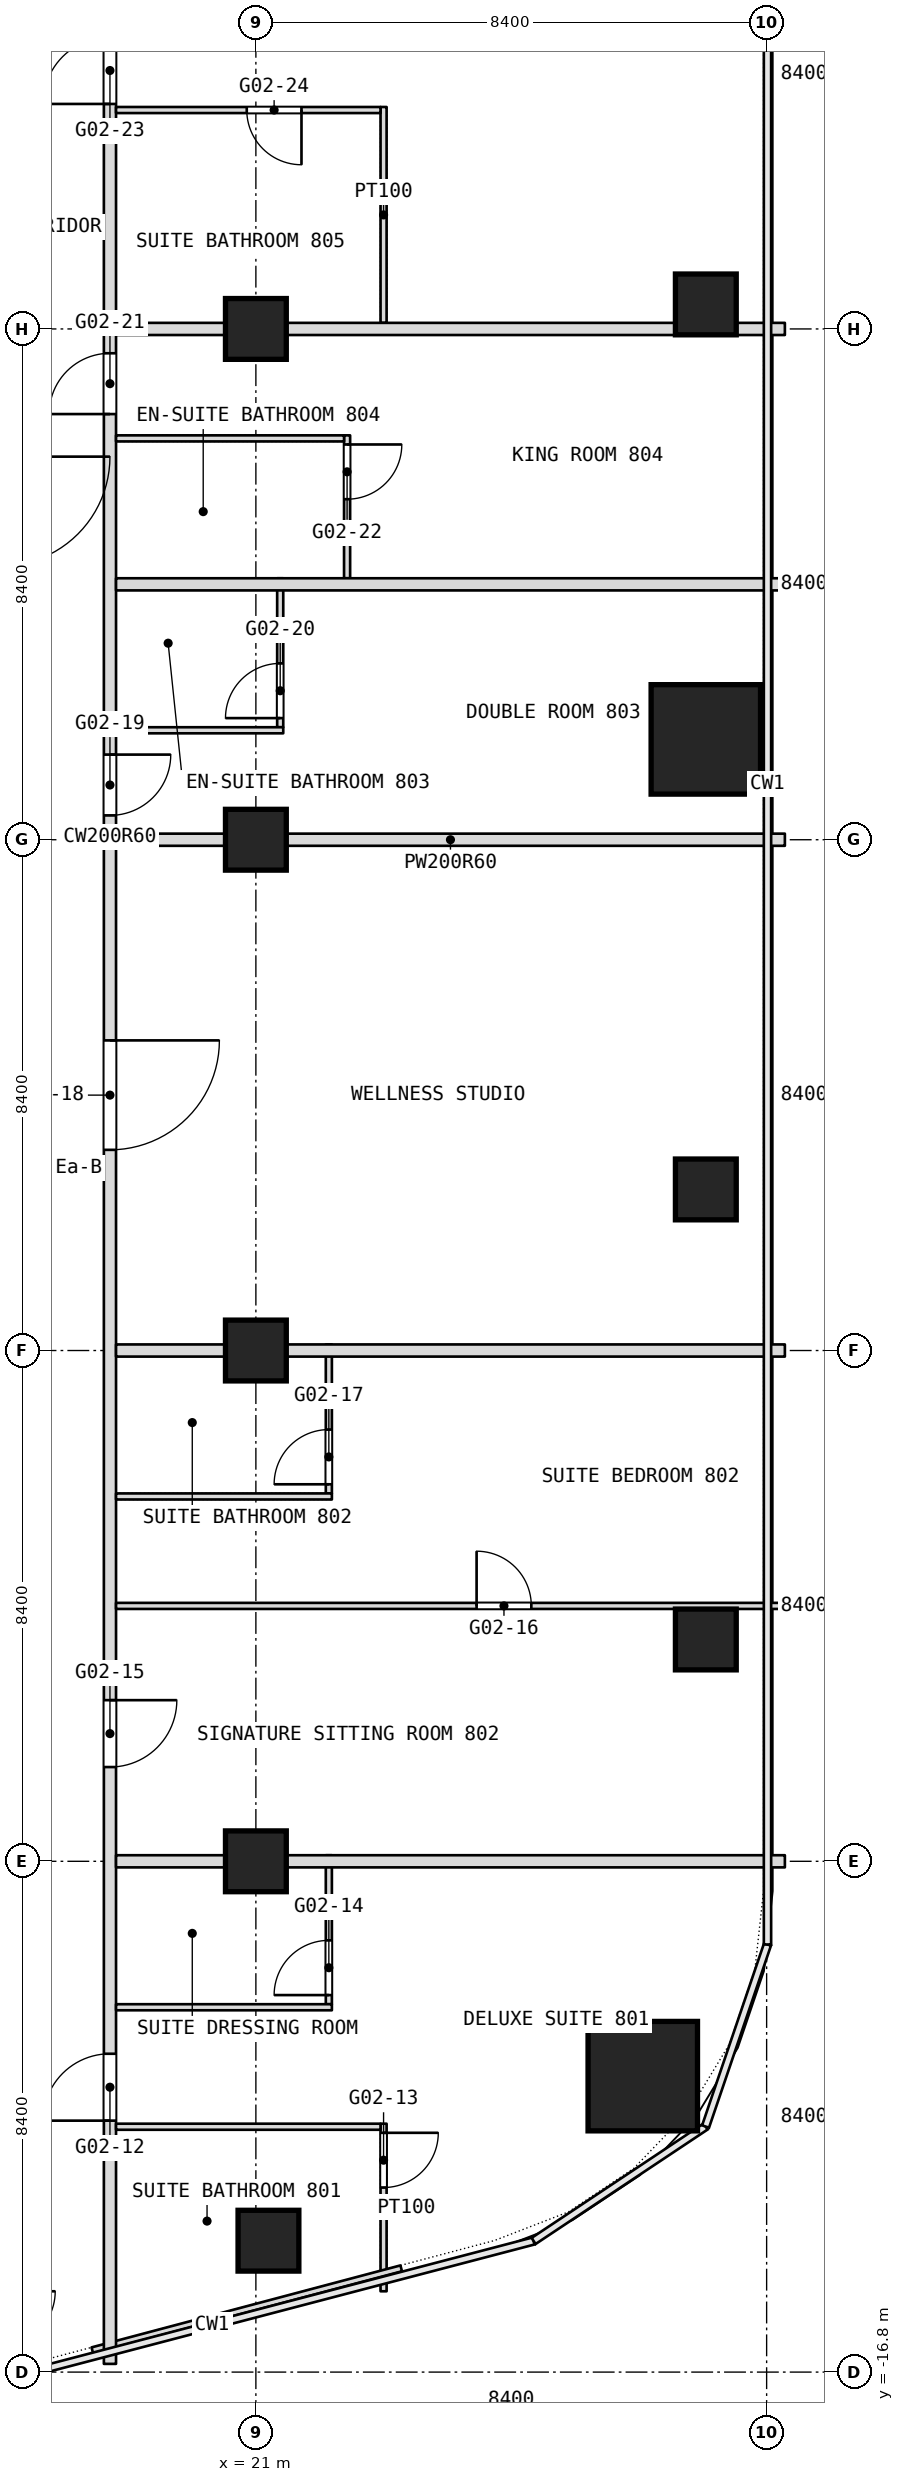
"""IFC4 building model, lengths in metres.
Left out: names, types, materials, properties, quantities, classifications, styles, units other than length and angle.
Written with IfcOpenShell. Run it as: python <this file> out.ifc"""

import sys

from ifc_helpers import new_model, si_unit, direction, frame, frame_2d, origin, origin_2d, place, context, subcontext, project, spatial, rectangle, extrude, element, fill, save


model = new_model("IFC4")
c1 = context("Model", 3, precision=1e-05, world=origin(), true_north=direction((0.0, 1.0)))
c2 = subcontext(c1, "Body", "Model", "MODEL_VIEW")
j1 = project(units=[si_unit("LENGTHUNIT", "METRE"), si_unit("PLANEANGLEUNIT", "RADIAN")], contexts=[c1])
p1 = place(None, origin())
s1 = spatial("IfcSite", under=j1, at=p1, CompositionType="ELEMENT")
p2 = place(p1, origin())
s2 = spatial("IfcBuilding", under=s1, at=p2, CompositionType="ELEMENT")
p3 = place(p2, frame((0.0, 0.0, 43.7)))
s3 = spatial("IfcBuildingStorey", under=s2, at=p3, CompositionType="ELEMENT", Elevation=43.7)
for number, where, z_axis, x_axis in (
    (1, (27.363, -11.933, 0.0), (0.0, 0.0, 1.0), (1.0, 0.0, 0.0)),
    (2, (28.4, 10.05, 0.0), (0.0, 0.0, 1.0), (1.0, 0.0, 0.0)),
):
    element("IfcColumn", number, at=place(p3, frame(where, z_axis=z_axis, x_axis=x_axis)), inside=s3, PredefinedType="COLUMN", context=c2, shape_type="SweptSolid", body=[
        extrude(rectangle(XDim=1.8, YDim=1.8, at=origin_2d()), origin(), (0.0, 0.0, 1.0), 3.6),
    ])
for number, where, z_axis, x_axis in (
    (3, (21.0, -8.4, 0.0), (0.0, 0.0, 1.0), (1.0, 0.0, 0.0)),
    (4, (21.0, 0.0, 0.0), (0.0, 0.0, 1.0), (1.0, 0.0, 0.0)),
    (5, (21.0, 8.4, 0.0), (0.0, 0.0, 1.0), (1.0, 0.0, 0.0)),
    (6, (21.0, 16.8, 0.0), (0.0, 0.0, 1.0), (1.0, 0.0, 0.0)),
    (7, (28.4, 17.203, 0.0), (0.0, 0.0, 1.0), (1.0, 0.0, 0.0)),
    (8, (28.4, 2.649, 0.0), (0.0, 0.0, 1.0), (1.0, 0.0, 0.0)),
    (9, (28.4, -4.752, 0.0), (0.0, 0.0, 1.0), (1.0, 0.0, 0.0)),
    (10, (21.207, -14.639, 0.0), (0.0, 0.0, 1.0), (1.0, 0.0, 0.0)),
):
    element("IfcColumn", number, at=place(p3, frame(where, z_axis=z_axis, x_axis=x_axis)), inside=s3, PredefinedType="COLUMN", context=c2, shape_type="SweptSolid", body=[
        extrude(rectangle(XDim=1.0, YDim=1.0, at=origin_2d()), origin(), (0.0, 0.0, 1.0), 3.6),
    ])
p4 = place(p3, frame((23.1, -15.471, 0.0), z_axis=(0.0, 0.0, 1.0), x_axis=(0.0, 1.0, 0.0)))
e11 = element("IfcWall", 11, at=p4, inside=s3, PredefinedType="PARTITIONING", context=c2, shape_type="SweptSolid", body=[
    extrude(rectangle(XDim=2.756, YDim=0.1, at=frame_2d((1.378, 0.0))), origin(), (0.0, 0.0, 1.0), 3.34),
])
p5 = place(p4, frame((1.706, 0.0, 0.0)))
e12 = element("IfcOpeningElement", 12, at=p5, cuts=e11, PredefinedType="OPENING", context=c2, shape_type="SweptSolid", body=[
    extrude(rectangle(XDim=0.9, YDim=2.1, at=frame_2d((0.45, 1.05))), frame((0.0, 0.05, 0.0), z_axis=(0.0, -1.0, 0.0), x_axis=(1.0, 0.0, 0.0)), (0.0, 0.0, 1.0), 0.1),
])
p6 = place(p3, frame((23.1, 16.9, 0.0), z_axis=(0.0, 0.0, 1.0), x_axis=(0.0, 1.0, 0.0)))
e13 = element("IfcWall", 13, at=p6, inside=s3, PredefinedType="PARTITIONING", context=c2, shape_type="SweptSolid", body=[
    extrude(rectangle(XDim=3.55, YDim=0.1, at=frame_2d((1.775, 0.0))), origin(), (0.0, 0.0, 1.0), 3.34),
])
p7 = place(p3, frame((22.5, 12.7, 0.0), z_axis=(0.0, 0.0, 1.0), x_axis=(0.0, 1.0, 0.0)))
e14 = element("IfcWall", 14, at=p7, inside=s3, PredefinedType="PARTITIONING", context=c2, shape_type="SweptSolid", body=[
    extrude(rectangle(XDim=2.35, YDim=0.1, at=frame_2d((1.175, 0.0))), origin(), (0.0, 0.0, 1.0), 3.34),
])
p8 = place(p7, frame((1.3, 0.0, 0.0)))
e15 = element("IfcOpeningElement", 15, at=p8, cuts=e14, PredefinedType="OPENING", context=c2, shape_type="SweptSolid", body=[
    extrude(rectangle(XDim=0.9, YDim=2.1, at=frame_2d((0.45, 1.05))), frame((0.0, 0.05, 0.0), z_axis=(0.0, -1.0, 0.0), x_axis=(1.0, 0.0, 0.0)), (0.0, 0.0, 1.0), 0.1),
])
p9 = place(p3, frame((22.2, -10.75, 0.0), z_axis=(0.0, 0.0, 1.0), x_axis=(0.0, 1.0, 0.0)))
e16 = element("IfcWall", 16, at=p9, inside=s3, PredefinedType="PARTITIONING", context=c2, shape_type="SweptSolid", body=[
    extrude(rectangle(XDim=2.45, YDim=0.1, at=frame_2d((1.225, 0.0))), origin(), (0.0, 0.0, 1.0), 3.34),
])
p10 = place(p9, frame((0.15, 0.0, 0.0)))
e17 = element("IfcOpeningElement", 17, at=p10, cuts=e16, PredefinedType="OPENING", context=c2, shape_type="SweptSolid", body=[
    extrude(rectangle(XDim=0.9, YDim=2.1, at=frame_2d((0.45, 1.05))), frame((0.0, 0.05, 0.0), z_axis=(0.0, -1.0, 0.0), x_axis=(1.0, 0.0, 0.0)), (0.0, 0.0, 1.0), 0.1),
])
p11 = place(p3, frame((22.2, -2.35, 0.0), z_axis=(0.0, 0.0, 1.0), x_axis=(0.0, 1.0, 0.0)))
e18 = element("IfcWall", 18, at=p11, inside=s3, PredefinedType="PARTITIONING", context=c2, shape_type="SweptSolid", body=[
    extrude(rectangle(XDim=2.45, YDim=0.1, at=frame_2d((1.225, 0.0))), origin(), (0.0, 0.0, 1.0), 3.34),
])
p12 = place(p11, frame((0.15, 0.0, 0.0)))
e19 = element("IfcOpeningElement", 19, at=p12, cuts=e18, PredefinedType="OPENING", context=c2, shape_type="SweptSolid", body=[
    extrude(rectangle(XDim=0.9, YDim=2.1, at=frame_2d((0.45, 1.05))), frame((0.0, 0.05, 0.0), z_axis=(0.0, -1.0, 0.0), x_axis=(1.0, 0.0, 0.0)), (0.0, 0.0, 1.0), 0.1),
])
p13 = place(p3, frame((21.4, 10.25, 0.0), z_axis=(0.0, 0.0, 1.0), x_axis=(0.0, 1.0, 0.0)))
e20 = element("IfcWall", 20, at=p13, inside=s3, PredefinedType="PARTITIONING", context=c2, shape_type="SweptSolid", body=[
    extrude(rectangle(XDim=2.45, YDim=0.1, at=frame_2d((1.225, 0.0))), origin(), (0.0, 0.0, 1.0), 3.34),
])
p14 = place(p13, frame((0.15, 0.0, 0.0)))
e21 = element("IfcOpeningElement", 21, at=p14, cuts=e20, PredefinedType="OPENING", context=c2, shape_type="SweptSolid", body=[
    extrude(rectangle(XDim=0.9, YDim=2.1, at=frame_2d((0.45, 1.05))), frame((0.0, 0.05, 0.0), z_axis=(0.0, -1.0, 0.0), x_axis=(1.0, 0.0, 0.0)), (0.0, 0.0, 1.0), 0.1),
])
p15 = place(p3, frame((18.31, -16.442, 0.0), z_axis=(0.0, 0.0, 1.0), x_axis=(0.966552628131, 0.256468354876, 0.0)))
e22 = element("IfcWall", 22, at=p15, inside=s3, PredefinedType="PARTITIONING", context=c2, shape_type="SweptSolid", body=[
    extrude(rectangle(XDim=5.256, YDim=0.1, at=frame_2d((2.628, 0.0))), origin(), (0.0, 0.0, 1.0), 3.34),
])
p16 = place(p3, frame((18.6, -16.665, 0.0), z_axis=(0.0, 0.0, 1.0), x_axis=(0.0, 1.0, 0.0)))
e23 = element("IfcWall", 23, at=p16, inside=s3, PredefinedType="PARTITIONING", context=c2, shape_type="SweptSolid", body=[
    extrude(rectangle(XDim=50.205, YDim=0.2, at=frame_2d((25.103, 0.0))), origin(), (0.0, 0.0, 1.0), 3.34),
])
p17 = place(p16, frame((4.0, 0.0, 0.0)))
e24 = element("IfcOpeningElement", 24, at=p17, cuts=e23, PredefinedType="OPENING", context=c2, shape_type="SweptSolid", body=[
    extrude(rectangle(XDim=1.1, YDim=2.1, at=frame_2d((0.55, 1.05))), frame((0.0, 0.1, 0.0), z_axis=(0.0, -1.0, 0.0), x_axis=(1.0, 0.0, 0.0)), (0.0, 0.0, 1.0), 0.2),
])
p18 = place(p16, frame((9.815, 0.0, 0.0)))
e25 = element("IfcOpeningElement", 25, at=p18, cuts=e23, PredefinedType="OPENING", context=c2, shape_type="SweptSolid", body=[
    extrude(rectangle(XDim=1.1, YDim=2.1, at=frame_2d((0.55, 1.05))), frame((0.0, 0.1, 0.0), z_axis=(0.0, -1.0, 0.0), x_axis=(1.0, 0.0, 0.0)), (0.0, 0.0, 1.0), 0.2),
])
p19 = place(p16, frame((19.965, 0.0, 0.0)))
e26 = element("IfcOpeningElement", 26, at=p19, cuts=e23, PredefinedType="OPENING", context=c2, shape_type="SweptSolid", body=[
    extrude(rectangle(XDim=1.8, YDim=2.1, at=frame_2d((0.9, 1.05))), frame((0.0, 0.1, 0.0), z_axis=(0.0, -1.0, 0.0), x_axis=(1.0, 0.0, 0.0)), (0.0, 0.0, 1.0), 0.2),
])
p20 = place(p16, frame((25.465, 0.0, 0.0)))
e27 = element("IfcOpeningElement", 27, at=p20, cuts=e23, PredefinedType="OPENING", context=c2, shape_type="SweptSolid", body=[
    extrude(rectangle(XDim=1.0, YDim=2.1, at=frame_2d((0.5, 1.05))), frame((0.0, 0.1, 0.0), z_axis=(0.0, -1.0, 0.0), x_axis=(1.0, 0.0, 0.0)), (0.0, 0.0, 1.0), 0.2),
])
p21 = place(p16, frame((32.065, 0.0, 0.0)))
e28 = element("IfcOpeningElement", 28, at=p21, cuts=e23, PredefinedType="OPENING", context=c2, shape_type="SweptSolid", body=[
    extrude(rectangle(XDim=1.0, YDim=2.1, at=frame_2d((0.5, 1.05))), frame((0.0, 0.1, 0.0), z_axis=(0.0, -1.0, 0.0), x_axis=(1.0, 0.0, 0.0)), (0.0, 0.0, 1.0), 0.2),
])
p22 = place(p16, frame((37.165, 0.0, 0.0)))
e29 = element("IfcOpeningElement", 29, at=p22, cuts=e23, PredefinedType="OPENING", context=c2, shape_type="SweptSolid", body=[
    extrude(rectangle(XDim=1.1, YDim=2.1, at=frame_2d((0.55, 1.05))), frame((0.0, 0.1, 0.0), z_axis=(0.0, -1.0, 0.0), x_axis=(1.0, 0.0, 0.0)), (0.0, 0.0, 1.0), 0.2),
])
p23 = place(p16, frame((42.265, 0.0, 0.0)))
e30 = element("IfcOpeningElement", 30, at=p23, cuts=e23, PredefinedType="OPENING", context=c2, shape_type="SweptSolid", body=[
    extrude(rectangle(XDim=1.0, YDim=2.1, at=frame_2d((0.5, 1.05))), frame((0.0, 0.1, 0.0), z_axis=(0.0, -1.0, 0.0), x_axis=(1.0, 0.0, 0.0)), (0.0, 0.0, 1.0), 0.2),
])
p24 = place(p16, frame((46.865, 0.0, 0.0)))
e31 = element("IfcOpeningElement", 31, at=p24, cuts=e23, PredefinedType="OPENING", context=c2, shape_type="SweptSolid", body=[
    extrude(rectangle(XDim=1.0, YDim=2.1, at=frame_2d((0.5, 1.05))), frame((0.0, 0.1, 0.0), z_axis=(0.0, -1.0, 0.0), x_axis=(1.0, 0.0, 0.0)), (0.0, 0.0, 1.0), 0.2),
])
p25 = place(p3, frame((18.7, -12.765, 0.0), z_axis=(0.0, 0.0, 1.0), x_axis=(1.0, 0.0, 0.0)))
e32 = element("IfcWall", 32, at=p25, inside=s3, PredefinedType="PARTITIONING", context=c2, shape_type="SweptSolid", body=[
    extrude(rectangle(XDim=4.35, YDim=0.1, at=frame_2d((2.175, 0.0))), origin(), (0.0, 0.0, 1.0), 3.34),
])
p26 = place(p3, frame((18.7, -10.8, 0.0), z_axis=(0.0, 0.0, 1.0), x_axis=(1.0, 0.0, 0.0)))
e33 = element("IfcWall", 33, at=p26, inside=s3, PredefinedType="PARTITIONING", context=c2, shape_type="SweptSolid", body=[
    extrude(rectangle(XDim=3.55, YDim=0.1, at=frame_2d((1.775, 0.0))), origin(), (0.0, 0.0, 1.0), 3.34),
])
p27 = place(p3, frame((18.7, -8.4, 0.0), z_axis=(0.0, 0.0, 1.0), x_axis=(1.0, 0.0, 0.0)))
e34 = element("IfcWall", 34, at=p27, inside=s3, PredefinedType="PARTITIONING", context=c2, shape_type="SweptSolid", body=[
    extrude(rectangle(XDim=11.0, YDim=0.2, at=frame_2d((5.5, 0.0))), origin(), (0.0, 0.0, 1.0), 2.84),
])
p28 = place(p3, frame((18.7, -4.2, 0.0), z_axis=(0.0, 0.0, 1.0), x_axis=(1.0, 0.0, 0.0)))
e35 = element("IfcWall", 35, at=p28, inside=s3, PredefinedType="PARTITIONING", context=c2, shape_type="SweptSolid", body=[
    extrude(rectangle(XDim=11.0, YDim=0.1, at=frame_2d((5.5, 0.0))), origin(), (0.0, 0.0, 1.0), 3.34),
])
p29 = place(p28, frame((5.93, 0.0, 0.0)))
e36 = element("IfcOpeningElement", 36, at=p29, cuts=e35, PredefinedType="OPENING", context=c2, shape_type="SweptSolid", body=[
    extrude(rectangle(XDim=0.9, YDim=2.1, at=frame_2d((0.45, 1.05))), frame((0.0, 0.05, 0.0), z_axis=(0.0, -1.0, 0.0), x_axis=(1.0, 0.0, 0.0)), (0.0, 0.0, 1.0), 0.1),
])
p30 = place(p3, frame((18.7, -2.4, 0.0), z_axis=(0.0, 0.0, 1.0), x_axis=(1.0, 0.0, 0.0)))
e37 = element("IfcWall", 37, at=p30, inside=s3, PredefinedType="PARTITIONING", context=c2, shape_type="SweptSolid", body=[
    extrude(rectangle(XDim=3.55, YDim=0.1, at=frame_2d((1.775, 0.0))), origin(), (0.0, 0.0, 1.0), 3.34),
])
for number, where, z_axis, x_axis in (
    (38, (18.7, 0.0, 0.0), (0.0, 0.0, 1.0), (1.0, 0.0, 0.0)),
    (39, (18.7, 8.4, 0.0), (0.0, 0.0, 1.0), (1.0, 0.0, 0.0)),
):
    element("IfcWall", number, at=place(p3, frame(where, z_axis=z_axis, x_axis=x_axis)), inside=s3, PredefinedType="PARTITIONING", context=c2, shape_type="SweptSolid", body=[
        extrude(rectangle(XDim=11.0, YDim=0.2, at=frame_2d((5.5, 0.0))), origin(), (0.0, 0.0, 1.0), 2.84),
    ])
p31 = place(p3, frame((18.7, 10.2, 0.0), z_axis=(0.0, 0.0, 1.0), x_axis=(1.0, 0.0, 0.0)))
e40 = element("IfcWall", 40, at=p31, inside=s3, PredefinedType="PARTITIONING", context=c2, shape_type="SweptSolid", body=[
    extrude(rectangle(XDim=2.75, YDim=0.1, at=frame_2d((1.375, 0.0))), origin(), (0.0, 0.0, 1.0), 3.34),
])
p32 = place(p3, frame((18.7, 12.6, 0.0), z_axis=(0.0, 0.0, 1.0), x_axis=(1.0, 0.0, 0.0)))
e41 = element("IfcWall", 41, at=p32, inside=s3, PredefinedType="PARTITIONING", context=c2, shape_type="SweptSolid", body=[
    extrude(rectangle(XDim=11.0, YDim=0.2, at=frame_2d((5.5, 0.0))), origin(), (0.0, 0.0, 1.0), 3.34),
])
p33 = place(p3, frame((18.7, 15.0, 0.0), z_axis=(0.0, 0.0, 1.0), x_axis=(1.0, 0.0, 0.0)))
e42 = element("IfcWall", 42, at=p33, inside=s3, PredefinedType="PARTITIONING", context=c2, shape_type="SweptSolid", body=[
    extrude(rectangle(XDim=3.75, YDim=0.1, at=frame_2d((1.875, 0.0))), origin(), (0.0, 0.0, 1.0), 3.34),
])
p34 = place(p3, frame((18.7, 16.8, 0.0), z_axis=(0.0, 0.0, 1.0), x_axis=(1.0, 0.0, 0.0)))
e43 = element("IfcWall", 43, at=p34, inside=s3, PredefinedType="PARTITIONING", context=c2, shape_type="SweptSolid", body=[
    extrude(rectangle(XDim=11.0, YDim=0.2, at=frame_2d((5.5, 0.0))), origin(), (0.0, 0.0, 1.0), 2.84),
])
p35 = place(p3, frame((18.7, 20.4, 0.0), z_axis=(0.0, 0.0, 1.0), x_axis=(1.0, 0.0, 0.0)))
e44 = element("IfcWall", 44, at=p35, inside=s3, PredefinedType="PARTITIONING", context=c2, shape_type="SweptSolid", body=[
    extrude(rectangle(XDim=4.35, YDim=0.1, at=frame_2d((2.175, 0.0))), origin(), (0.0, 0.0, 1.0), 3.34),
])
p36 = place(p35, frame((2.15, 0.0, 0.0)))
e45 = element("IfcOpeningElement", 45, at=p36, cuts=e44, PredefinedType="OPENING", context=c2, shape_type="SweptSolid", body=[
    extrude(rectangle(XDim=0.9, YDim=2.1, at=frame_2d((0.45, 1.05))), frame((0.0, 0.05, 0.0), z_axis=(0.0, -1.0, 0.0), x_axis=(1.0, 0.0, 0.0)), (0.0, 0.0, 1.0), 0.1),
])
p37 = place(p5, origin())
e46 = element("IfcDoor", 46, at=p37, inside=s3, OperationType="SINGLE_SWING_RIGHT", PredefinedType="DOOR", context=c2, shape_type="SweptSolid", body=[
    extrude(rectangle(XDim=0.9, YDim=2.1, at=frame_2d((0.45, 1.05))), frame((0.0, 0.025, 0.0), z_axis=(0.0, -1.0, 0.0), x_axis=(1.0, 0.0, 0.0)), (0.0, 0.0, 1.0), 0.05),
])
fill(e12, e46)
p38 = place(p8, origin())
e47 = element("IfcDoor", 47, at=p38, inside=s3, OperationType="SINGLE_SWING_RIGHT", PredefinedType="DOOR", context=c2, shape_type="SweptSolid", body=[
    extrude(rectangle(XDim=0.9, YDim=2.1, at=frame_2d((0.45, 1.05))), frame((0.0, 0.025, 0.0), z_axis=(0.0, -1.0, 0.0), x_axis=(1.0, 0.0, 0.0)), (0.0, 0.0, 1.0), 0.05),
])
fill(e15, e47)
p39 = place(p10, origin())
e48 = element("IfcDoor", 48, at=p39, inside=s3, OperationType="SINGLE_SWING_LEFT", PredefinedType="DOOR", context=c2, shape_type="SweptSolid", body=[
    extrude(rectangle(XDim=0.9, YDim=2.1, at=frame_2d((0.45, 1.05))), frame((0.0, 0.025, 0.0), z_axis=(0.0, -1.0, 0.0), x_axis=(1.0, 0.0, 0.0)), (0.0, 0.0, 1.0), 0.05),
])
fill(e17, e48)
p40 = place(p12, origin())
e49 = element("IfcDoor", 49, at=p40, inside=s3, OperationType="SINGLE_SWING_LEFT", PredefinedType="DOOR", context=c2, shape_type="SweptSolid", body=[
    extrude(rectangle(XDim=0.9, YDim=2.1, at=frame_2d((0.45, 1.05))), frame((0.0, 0.025, 0.0), z_axis=(0.0, -1.0, 0.0), x_axis=(1.0, 0.0, 0.0)), (0.0, 0.0, 1.0), 0.05),
])
fill(e19, e49)
p41 = place(p14, origin())
e50 = element("IfcDoor", 50, at=p41, inside=s3, OperationType="SINGLE_SWING_LEFT", PredefinedType="DOOR", context=c2, shape_type="SweptSolid", body=[
    extrude(rectangle(XDim=0.9, YDim=2.1, at=frame_2d((0.45, 1.05))), frame((0.0, 0.025, 0.0), z_axis=(0.0, -1.0, 0.0), x_axis=(1.0, 0.0, 0.0)), (0.0, 0.0, 1.0), 0.05),
])
fill(e21, e50)
p42 = place(p17, origin())
e51 = element("IfcDoor", 51, at=p42, inside=s3, OperationType="SINGLE_SWING_RIGHT", PredefinedType="DOOR", context=c2, shape_type="SweptSolid", body=[
    extrude(rectangle(XDim=1.1, YDim=2.1, at=frame_2d((0.55, 1.05))), frame((0.0, 0.025, 0.0), z_axis=(0.0, -1.0, 0.0), x_axis=(1.0, 0.0, 0.0)), (0.0, 0.0, 1.0), 0.05),
])
fill(e24, e51)
p43 = place(p18, origin())
e52 = element("IfcDoor", 52, at=p43, inside=s3, OperationType="SINGLE_SWING_LEFT", PredefinedType="DOOR", context=c2, shape_type="SweptSolid", body=[
    extrude(rectangle(XDim=1.1, YDim=2.1, at=frame_2d((0.55, 1.05))), frame((0.0, 0.025, 0.0), z_axis=(0.0, -1.0, 0.0), x_axis=(1.0, 0.0, 0.0)), (0.0, 0.0, 1.0), 0.05),
])
fill(e25, e52)
p44 = place(p19, origin())
e53 = element("IfcDoor", 53, at=p44, inside=s3, OperationType="DOUBLE_DOOR_SINGLE_SWING", PredefinedType="DOOR", context=c2, shape_type="SweptSolid", body=[
    extrude(rectangle(XDim=1.8, YDim=2.1, at=frame_2d((0.9, 1.05))), frame((0.0, 0.025, 0.0), z_axis=(0.0, -1.0, 0.0), x_axis=(1.0, 0.0, 0.0)), (0.0, 0.0, 1.0), 0.05),
])
fill(e26, e53)
p45 = place(p20, origin())
e54 = element("IfcDoor", 54, at=p45, inside=s3, OperationType="SINGLE_SWING_LEFT", PredefinedType="DOOR", context=c2, shape_type="SweptSolid", body=[
    extrude(rectangle(XDim=1.0, YDim=2.1, at=frame_2d((0.5, 1.05))), frame((0.0, 0.025, 0.0), z_axis=(0.0, -1.0, 0.0), x_axis=(1.0, 0.0, 0.0)), (0.0, 0.0, 1.0), 0.05),
])
fill(e27, e54)
p46 = place(p21, origin())
e55 = element("IfcDoor", 55, at=p46, inside=s3, OperationType="SINGLE_SWING_LEFT", PredefinedType="DOOR", context=c2, shape_type="SweptSolid", body=[
    extrude(rectangle(XDim=1.0, YDim=2.1, at=frame_2d((0.5, 1.05))), frame((0.0, 0.025, 0.0), z_axis=(0.0, -1.0, 0.0), x_axis=(1.0, 0.0, 0.0)), (0.0, 0.0, 1.0), 0.05),
])
fill(e28, e55)
p47 = place(p22, origin())
e56 = element("IfcDoor", 56, at=p47, inside=s3, OperationType="SINGLE_SWING_RIGHT", PredefinedType="DOOR", context=c2, shape_type="SweptSolid", body=[
    extrude(rectangle(XDim=1.1, YDim=2.1, at=frame_2d((0.55, 1.05))), frame((0.0, 0.025, 0.0), z_axis=(0.0, -1.0, 0.0), x_axis=(1.0, 0.0, 0.0)), (0.0, 0.0, 1.0), 0.05),
])
fill(e29, e56)
p48 = place(p29, origin())
e57 = element("IfcDoor", 57, at=p48, inside=s3, OperationType="SINGLE_SWING_RIGHT", PredefinedType="DOOR", context=c2, shape_type="SweptSolid", body=[
    extrude(rectangle(XDim=0.9, YDim=2.1, at=frame_2d((0.45, 1.05))), frame((0.0, 0.025, 0.0), z_axis=(0.0, -1.0, 0.0), x_axis=(1.0, 0.0, 0.0)), (0.0, 0.0, 1.0), 0.05),
])
fill(e36, e57)
p49 = place(p36, origin())
e58 = element("IfcDoor", 58, at=p49, inside=s3, OperationType="SINGLE_SWING_LEFT", PredefinedType="DOOR", context=c2, shape_type="SweptSolid", body=[
    extrude(rectangle(XDim=0.9, YDim=2.1, at=frame_2d((0.45, 1.05))), frame((0.0, 0.025, 0.0), z_axis=(0.0, -1.0, 0.0), x_axis=(1.0, 0.0, 0.0)), (0.0, 0.0, 1.0), 0.05),
])
fill(e45, e58)
save(model, sys.argv[1])
